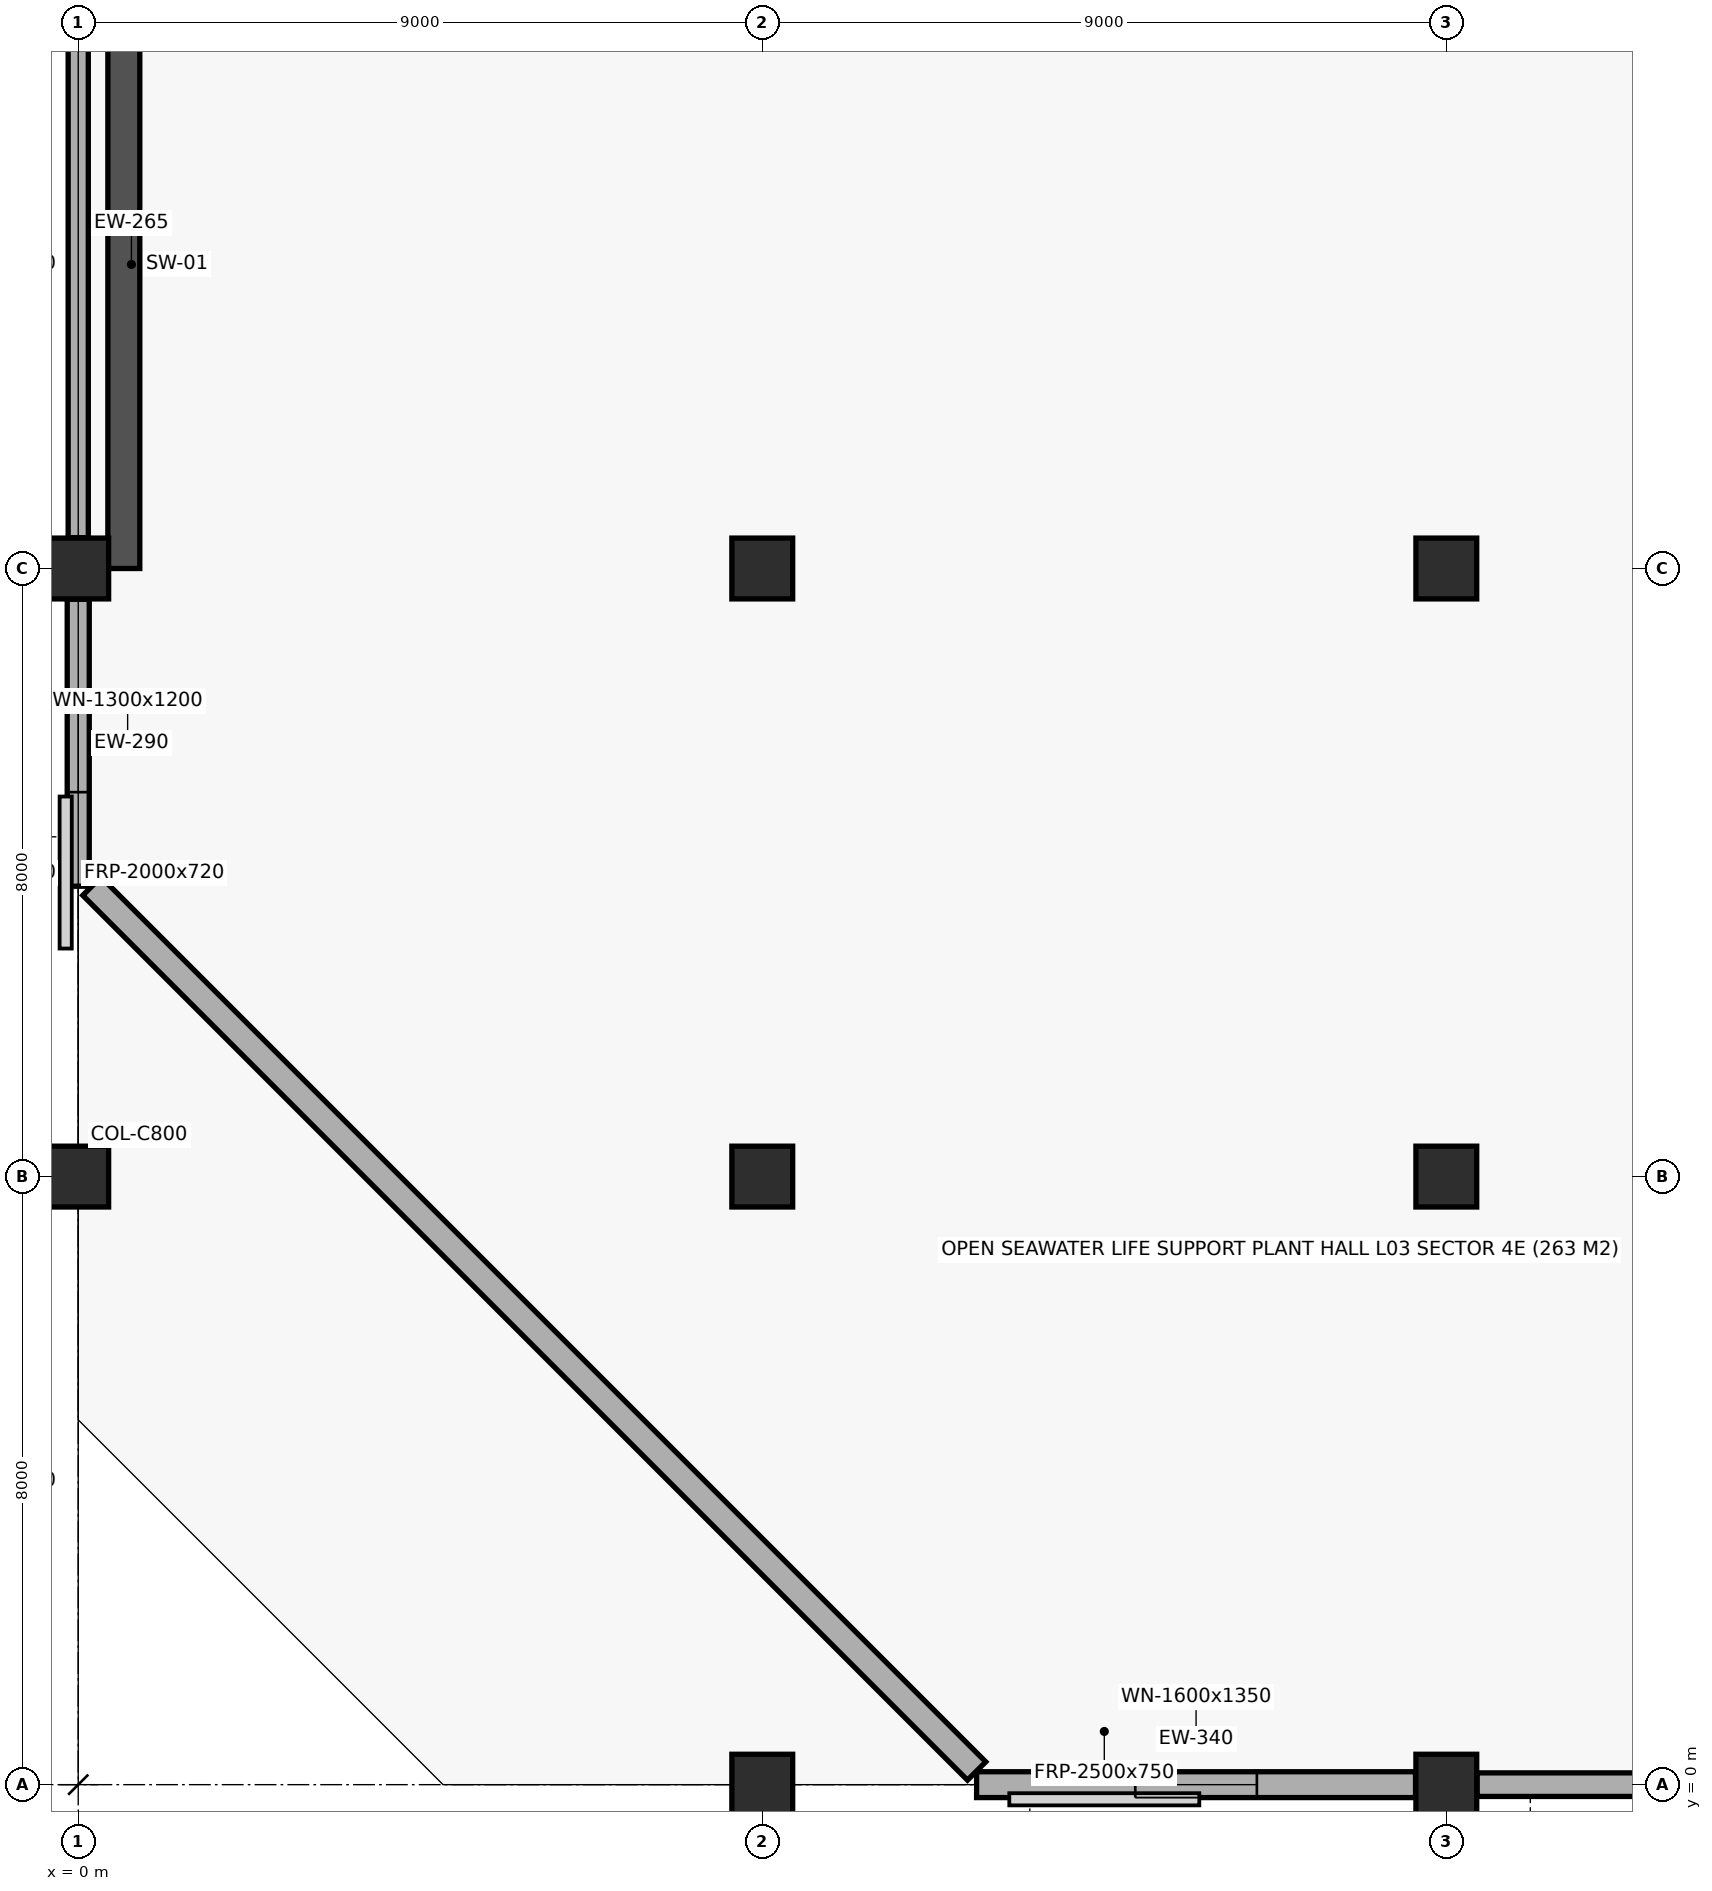
"""IFC4 building model, lengths in metres.
Left out: names, types, materials, properties, quantities, classifications, styles, units other than length and angle.
Written with IfcOpenShell. Run it as: python <this file> out.ifc"""

import sys

from ifc_helpers import new_model, si_unit, direction, frame, frame_2d, origin, origin_2d, place, context, subcontext, project, spatial, rectangle, extrude, element, fill, save


model = new_model("IFC4")
c1 = context("Model", 3, precision=1e-05, world=origin(), true_north=direction((0.0, 1.0)))
c2 = subcontext(c1, "Body", "Model", "MODEL_VIEW")
j1 = project(units=[si_unit("LENGTHUNIT", "METRE"), si_unit("PLANEANGLEUNIT", "RADIAN")], contexts=[c1])
p1 = place(None, origin())
s1 = spatial("IfcSite", under=j1, at=p1, CompositionType="ELEMENT")
p2 = place(p1, origin())
s2 = spatial("IfcBuilding", under=s1, at=p2, CompositionType="ELEMENT")
p3 = place(p2, frame((0.0, 0.0, 13.5)))
s3 = spatial("IfcBuildingStorey", under=s2, at=p3, CompositionType="ELEMENT", Elevation=13.5)
for number, where, z_axis, x_axis in (
    (1, (0.0, 8.0, 0.0), (0.0, 0.0, 1.0), (1.0, 0.0, 0.0)),
    (2, (0.0, 16.0, 0.0), (0.0, 0.0, 1.0), (1.0, 0.0, 0.0)),
    (3, (9.0, 0.0, 0.0), (0.0, 0.0, 1.0), (1.0, 0.0, 0.0)),
    (4, (9.0, 8.0, 0.0), (0.0, 0.0, 1.0), (1.0, 0.0, 0.0)),
    (5, (9.0, 16.0, 0.0), (0.0, 0.0, 1.0), (1.0, 0.0, 0.0)),
    (6, (18.0, 0.0, 0.0), (0.0, 0.0, 1.0), (1.0, 0.0, 0.0)),
    (7, (18.0, 8.0, 0.0), (0.0, 0.0, 1.0), (1.0, 0.0, 0.0)),
    (8, (18.0, 16.0, 0.0), (0.0, 0.0, 1.0), (1.0, 0.0, 0.0)),
):
    element("IfcColumn", number, at=place(p3, frame(where, z_axis=z_axis, x_axis=x_axis)), inside=s3, PredefinedType="COLUMN", context=c2, shape_type="SweptSolid", body=[
        extrude(rectangle(XDim=0.8, YDim=0.8, at=origin_2d()), origin(), (0.0, 0.0, 1.0), 4.2),
    ])
p4 = place(p3, frame((0.6, 16.0, 0.0), z_axis=(0.0, 0.0, 1.0), x_axis=(0.0, 1.0, 0.0)))
e9 = element("IfcWall", 9, at=p4, inside=s3, PredefinedType="SHEAR", context=c2, shape_type="SweptSolid", body=[
    extrude(rectangle(XDim=8.0, YDim=0.42, at=frame_2d((4.0, 0.0))), origin(), (0.0, 0.0, 1.0), 4.2),
])
p5 = place(p3, frame((11.82, 0.0, 0.0), z_axis=(0.0, 0.0, 1.0), x_axis=(1.0, 0.0, 0.0)))
e10 = element("IfcWall", 10, at=p5, inside=s3, PredefinedType="STANDARD", context=c2, shape_type="SweptSolid", body=[
    extrude(rectangle(XDim=5.775, YDim=0.34, at=frame_2d((2.887, 0.0))), origin(), (0.0, 0.0, 1.0), 3.48),
])
p6 = place(p5, frame((2.087, 0.0, 0.85)))
e11 = element("IfcOpeningElement", 11, at=p6, cuts=e10, PredefinedType="OPENING", context=c2, shape_type="SweptSolid", body=[
    extrude(rectangle(XDim=1.6, YDim=1.35, at=frame_2d((0.8, 0.675))), frame((0.0, 0.182, 0.0), z_axis=(0.0, -1.0, 0.0), x_axis=(1.0, 0.0, 0.0)), (0.0, 0.0, 1.0), 0.364),
])
p7 = place(p3, frame((18.405, 0.0, 0.0), z_axis=(0.0, 0.0, 1.0), x_axis=(1.0, 0.0, 0.0)))
e12 = element("IfcWall", 12, at=p7, inside=s3, PredefinedType="STANDARD", context=c2, shape_type="SweptSolid", body=[
    extrude(rectangle(XDim=8.19, YDim=0.31, at=frame_2d((4.095, 0.0))), origin(), (0.0, 0.0, 1.0), 3.48),
])
p8 = place(p7, frame((3.395, 0.0, 0.85)))
e13 = element("IfcOpeningElement", 13, at=p8, cuts=e12, PredefinedType="OPENING", context=c2, shape_type="SweptSolid", body=[
    extrude(rectangle(XDim=1.4, YDim=1.35, at=frame_2d((0.7, 0.675))), frame((0.0, 0.167, 0.0), z_axis=(0.0, -1.0, 0.0), x_axis=(1.0, 0.0, 0.0)), (0.0, 0.0, 1.0), 0.334),
])
p9 = place(p3, frame((0.18, 11.82, 0.0), z_axis=(0.0, 0.0, 1.0), x_axis=(0.707106781187, -0.707106781187, 0.0)))
e14 = element("IfcWall", 14, at=p9, inside=s3, PredefinedType="STANDARD", context=c2, shape_type="SweptSolid", body=[
    extrude(rectangle(XDim=16.462, YDim=0.34, at=frame_2d((8.231, 0.0))), origin(), (0.0, 0.0, 1.0), 3.48),
])
p10 = place(p3, frame((0.0, 11.82, 0.0), z_axis=(0.0, 0.0, 1.0), x_axis=(0.0, 1.0, 0.0)))
e15 = element("IfcWall", 15, at=p10, inside=s3, PredefinedType="STANDARD", context=c2, shape_type="SweptSolid", body=[
    extrude(rectangle(XDim=3.775, YDim=0.29, at=frame_2d((1.887, 0.0))), origin(), (0.0, 0.0, 1.0), 3.48),
])
p11 = place(p10, frame((1.238, 0.0, 0.85)))
e16 = element("IfcOpeningElement", 16, at=p11, cuts=e15, PredefinedType="OPENING", context=c2, shape_type="SweptSolid", body=[
    extrude(rectangle(XDim=1.3, YDim=1.2, at=frame_2d((0.65, 0.6))), frame((0.0, 0.157, 0.0), z_axis=(0.0, -1.0, 0.0), x_axis=(1.0, 0.0, 0.0)), (0.0, 0.0, 1.0), 0.314),
])
p12 = place(p3, frame((0.0, 16.405, 0.0), z_axis=(0.0, 0.0, 1.0), x_axis=(0.0, 1.0, 0.0)))
e17 = element("IfcWall", 17, at=p12, inside=s3, PredefinedType="STANDARD", context=c2, shape_type="SweptSolid", body=[
    extrude(rectangle(XDim=7.19, YDim=0.265, at=frame_2d((3.595, 0.0))), origin(), (0.0, 0.0, 1.0), 3.48),
])
p13 = place(p6, origin())
e18 = element("IfcWindow", 18, at=p13, inside=s3, PartitioningType="SINGLE_PANEL", PredefinedType="WINDOW", context=c2, shape_type="SweptSolid", body=[
    extrude(rectangle(XDim=1.6, YDim=1.35, at=frame_2d((0.8, 0.675))), frame((0.0, 0.03, 0.0), z_axis=(0.0, -1.0, 0.0), x_axis=(1.0, 0.0, 0.0)), (0.0, 0.0, 1.0), 0.06),
])
fill(e11, e18)
p14 = place(p11, origin())
e19 = element("IfcWindow", 19, at=p14, inside=s3, PartitioningType="SINGLE_PANEL", PredefinedType="WINDOW", context=c2, shape_type="SweptSolid", body=[
    extrude(rectangle(XDim=1.3, YDim=1.2, at=frame_2d((0.65, 0.6))), frame((0.0, 0.03, 0.0), z_axis=(0.0, -1.0, 0.0), x_axis=(1.0, 0.0, 0.0)), (0.0, 0.0, 1.0), 0.06),
])
fill(e16, e19)
save(model, sys.argv[1])
